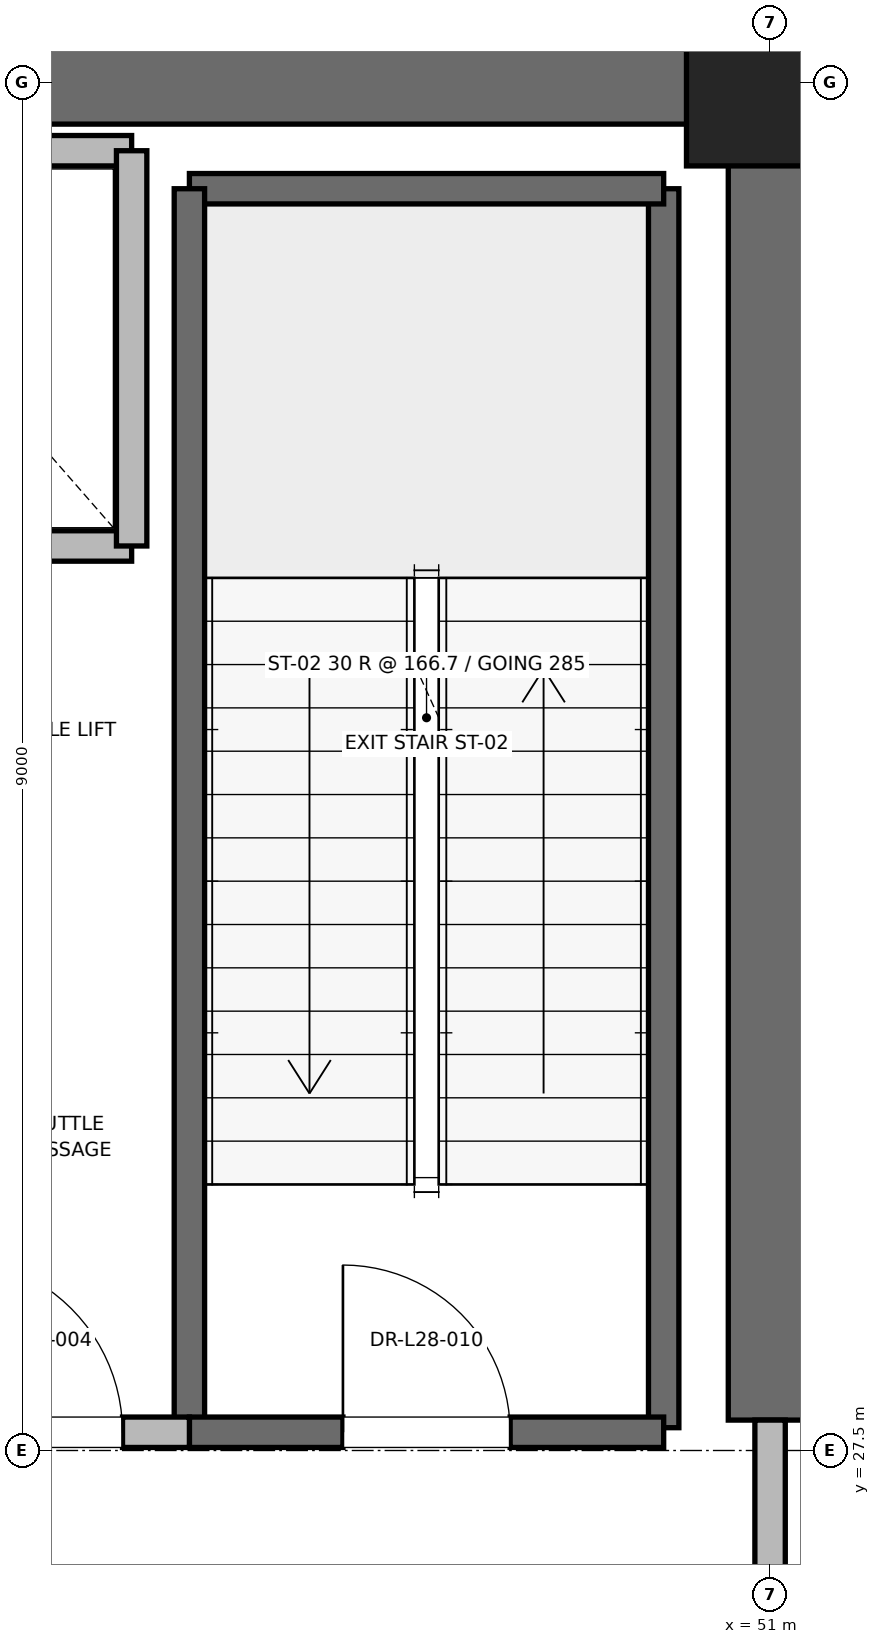
"""IFC4 building model, lengths in metres.
Left out: names, types, materials, properties, quantities, classifications, styles, units other than length and angle.
Written with IfcOpenShell. Run it as: python <this file> out.ifc"""

import sys

from ifc_helpers import new_model, si_unit, direction, frame, frame_2d, origin, origin_2d, place, context, subcontext, project, spatial, rectangle, extrude, element, fill, save


model = new_model("IFC4")
c1 = context("Model", 3, precision=1e-05, world=origin(), true_north=direction((0.0, 1.0)))
c2 = subcontext(c1, "Body", "Model", "MODEL_VIEW")
j1 = project(units=[si_unit("LENGTHUNIT", "METRE"), si_unit("PLANEANGLEUNIT", "RADIAN")], contexts=[c1])
p1 = place(None, origin())
s1 = spatial("IfcSite", under=j1, at=p1, CompositionType="ELEMENT")
p2 = place(p1, origin())
s2 = spatial("IfcBuilding", under=s1, at=p2, CompositionType="ELEMENT")
p3 = place(p2, frame((0.0, 0.0, 123.4)))
s3 = spatial("IfcBuildingStorey", under=s2, at=p3, CompositionType="ELEMENT", Elevation=123.4)
p4 = place(p3, frame((51.0, 36.5, 0.0), z_axis=(0.0, 0.0, 1.0), x_axis=(1.0, 0.0, 0.0)))
e1 = element("IfcColumn", 1, at=p4, inside=s3, PredefinedType="PILASTER", context=c2, shape_type="SweptSolid", body=[
    extrude(rectangle(XDim=1.1, YDim=1.1, at=origin_2d()), origin(), (0.0, 0.0, 1.0), 5.0),
])
p5 = place(p3, frame((45.2, 36.5, 0.0), z_axis=(0.0, 0.0, 1.0), x_axis=(1.0, 0.0, 0.0)))
e2 = element("IfcWall", 2, at=p5, inside=s3, PredefinedType="SHEAR", context=c2, shape_type="SweptSolid", body=[
    extrude(rectangle(XDim=5.8, YDim=0.55, at=frame_2d((2.9, 0.0))), origin(), (0.0, 0.0, 1.0), 4.775),
])
p6 = place(p3, frame((51.0, 27.7, 0.0), z_axis=(0.0, 0.0, 1.0), x_axis=(0.0, 1.0, 0.0)))
e3 = element("IfcWall", 3, at=p6, inside=s3, PredefinedType="SHEAR", context=c2, shape_type="SweptSolid", body=[
    extrude(rectangle(XDim=8.8, YDim=0.55, at=frame_2d((4.4, 0.0))), origin(), (0.0, 0.0, 1.0), 4.775),
])
p7 = place(p3, frame((50.3, 27.65, 0.0), z_axis=(0.0, 0.0, 1.0), x_axis=(0.0, 1.0, 0.0)))
e4 = element("IfcWall", 4, at=p7, inside=s3, PredefinedType="SOLIDWALL", context=c2, shape_type="SweptSolid", body=[
    extrude(rectangle(XDim=8.15, YDim=0.2, at=frame_2d((4.075, 0.0))), origin(), (0.0, 0.0, 1.0), 4.775),
])
p8 = place(p3, frame((47.18, 35.8, 0.0), z_axis=(0.0, 0.0, 1.0), x_axis=(1.0, 0.0, 0.0)))
e5 = element("IfcWall", 5, at=p8, inside=s3, PredefinedType="SOLIDWALL", context=c2, shape_type="SweptSolid", body=[
    extrude(rectangle(XDim=3.12, YDim=0.2, at=frame_2d((1.56, 0.0))), origin(), (0.0, 0.0, 1.0), 4.775),
])
p9 = place(p3, frame((47.18, 27.62, 0.0), z_axis=(0.0, 0.0, 1.0), x_axis=(0.0, 1.0, 0.0)))
e6 = element("IfcWall", 6, at=p9, inside=s3, PredefinedType="SOLIDWALL", context=c2, shape_type="SweptSolid", body=[
    extrude(rectangle(XDim=8.18, YDim=0.2, at=frame_2d((4.09, 0.0))), origin(), (0.0, 0.0, 1.0), 4.775),
])
p10 = place(p3, frame((47.18, 27.62, 0.0), z_axis=(0.0, 0.0, 1.0), x_axis=(1.0, 0.0, 0.0)))
e7 = element("IfcWall", 7, at=p10, inside=s3, PredefinedType="SOLIDWALL", context=c2, shape_type="SweptSolid", body=[
    extrude(rectangle(XDim=3.12, YDim=0.2, at=frame_2d((1.56, 0.0))), origin(), (0.0, 0.0, 1.0), 4.775),
])
p11 = place(p10, frame((1.01, 0.0, 0.0)))
e8 = element("IfcOpeningElement", 8, at=p11, cuts=e7, PredefinedType="OPENING", context=c2, shape_type="SweptSolid", body=[
    extrude(rectangle(XDim=1.1, YDim=2.15, at=frame_2d((0.55, 1.075))), frame((0.0, 0.1, 0.0), z_axis=(0.0, -1.0, 0.0), x_axis=(1.0, 0.0, 0.0)), (0.0, 0.0, 1.0), 0.2),
])
p12 = place(p3, frame((45.15, 27.62, 0.0), z_axis=(0.0, 0.0, 1.0), x_axis=(1.0, 0.0, 0.0)))
e9 = element("IfcWall", 9, at=p12, inside=s3, PredefinedType="PARTITIONING", context=c2, shape_type="SweptSolid", body=[
    extrude(rectangle(XDim=2.03, YDim=0.2, at=frame_2d((1.015, 0.0))), origin(), (0.0, 0.0, 1.0), 4.775),
])
p13 = place(p12, frame((0.44, 0.0, 0.0)))
e10 = element("IfcOpeningElement", 10, at=p13, cuts=e9, PredefinedType="OPENING", context=c2, shape_type="SweptSolid", body=[
    extrude(rectangle(XDim=1.15, YDim=2.2, at=frame_2d((0.575, 1.1))), frame((0.0, 0.1, 0.0), z_axis=(0.0, -1.0, 0.0), x_axis=(1.0, 0.0, 0.0)), (0.0, 0.0, 1.0), 0.2),
])
p14 = place(p3, frame((51.0, 24.3, 0.0), z_axis=(0.0, 0.0, 1.0), x_axis=(0.0, 1.0, 0.0)))
e11 = element("IfcWall", 11, at=p14, inside=s3, PredefinedType="PARTITIONING", context=c2, shape_type="SweptSolid", body=[
    extrude(rectangle(XDim=3.4, YDim=0.2, at=frame_2d((1.7, 0.0))), origin(), (0.0, 0.0, 1.0), 3.755),
])
p15 = place(p14, frame((1.125, 0.0, 0.0)))
e12 = element("IfcOpeningElement", 12, at=p15, cuts=e11, PredefinedType="OPENING", context=c2, shape_type="SweptSolid", body=[
    extrude(rectangle(XDim=1.15, YDim=2.2, at=frame_2d((0.575, 1.1))), frame((0.0, 0.1, 0.0), z_axis=(0.0, -1.0, 0.0), x_axis=(1.0, 0.0, 0.0)), (0.0, 0.0, 1.0), 0.2),
])
p16 = place(p3, frame((44.5, 33.45, 0.0), z_axis=(0.0, 0.0, 1.0), x_axis=(1.0, 0.0, 0.0)))
e13 = element("IfcWall", 13, at=p16, inside=s3, PredefinedType="SOLIDWALL", context=c2, shape_type="SweptSolid", body=[
    extrude(rectangle(XDim=2.3, YDim=0.2, at=frame_2d((1.15, 0.0))), origin(), (0.0, 0.0, 1.0), 4.775),
])
p17 = place(p3, frame((46.8, 36.05, 0.0), z_axis=(0.0, 0.0, 1.0), x_axis=(-1.0, 0.0, 0.0)))
e14 = element("IfcWall", 14, at=p17, inside=s3, PredefinedType="SOLIDWALL", context=c2, shape_type="SweptSolid", body=[
    extrude(rectangle(XDim=2.3, YDim=0.2, at=frame_2d((1.15, 0.0))), origin(), (0.0, 0.0, 1.0), 3.755),
])
p18 = place(p3, frame((46.8, 33.45, 0.0), z_axis=(0.0, 0.0, 1.0), x_axis=(0.0, 1.0, 0.0)))
e15 = element("IfcWall", 15, at=p18, inside=s3, PredefinedType="SOLIDWALL", context=c2, shape_type="SweptSolid", body=[
    extrude(rectangle(XDim=2.6, YDim=0.2, at=frame_2d((1.3, 0.0))), origin(), (0.0, 0.0, 1.0), 4.775),
])
p19 = place(p11, origin())
e16 = element("IfcDoor", 16, at=p19, inside=s3, OperationType="SINGLE_SWING_LEFT", PredefinedType="DOOR", context=c2, shape_type="SweptSolid", body=[
    extrude(rectangle(XDim=1.1, YDim=2.15, at=frame_2d((0.55, 1.075))), frame((0.0, 0.025, 0.0), z_axis=(0.0, -1.0, 0.0), x_axis=(1.0, 0.0, 0.0)), (0.0, 0.0, 1.0), 0.05),
])
fill(e8, e16)
p20 = place(p13, origin())
e17 = element("IfcDoor", 17, at=p20, inside=s3, OperationType="SINGLE_SWING_LEFT", PredefinedType="DOOR", context=c2, shape_type="SweptSolid", body=[
    extrude(rectangle(XDim=1.15, YDim=2.2, at=frame_2d((0.575, 1.1))), frame((0.0, 0.025, 0.0), z_axis=(0.0, -1.0, 0.0), x_axis=(1.0, 0.0, 0.0)), (0.0, 0.0, 1.0), 0.05),
])
fill(e10, e17)
save(model, sys.argv[1])
